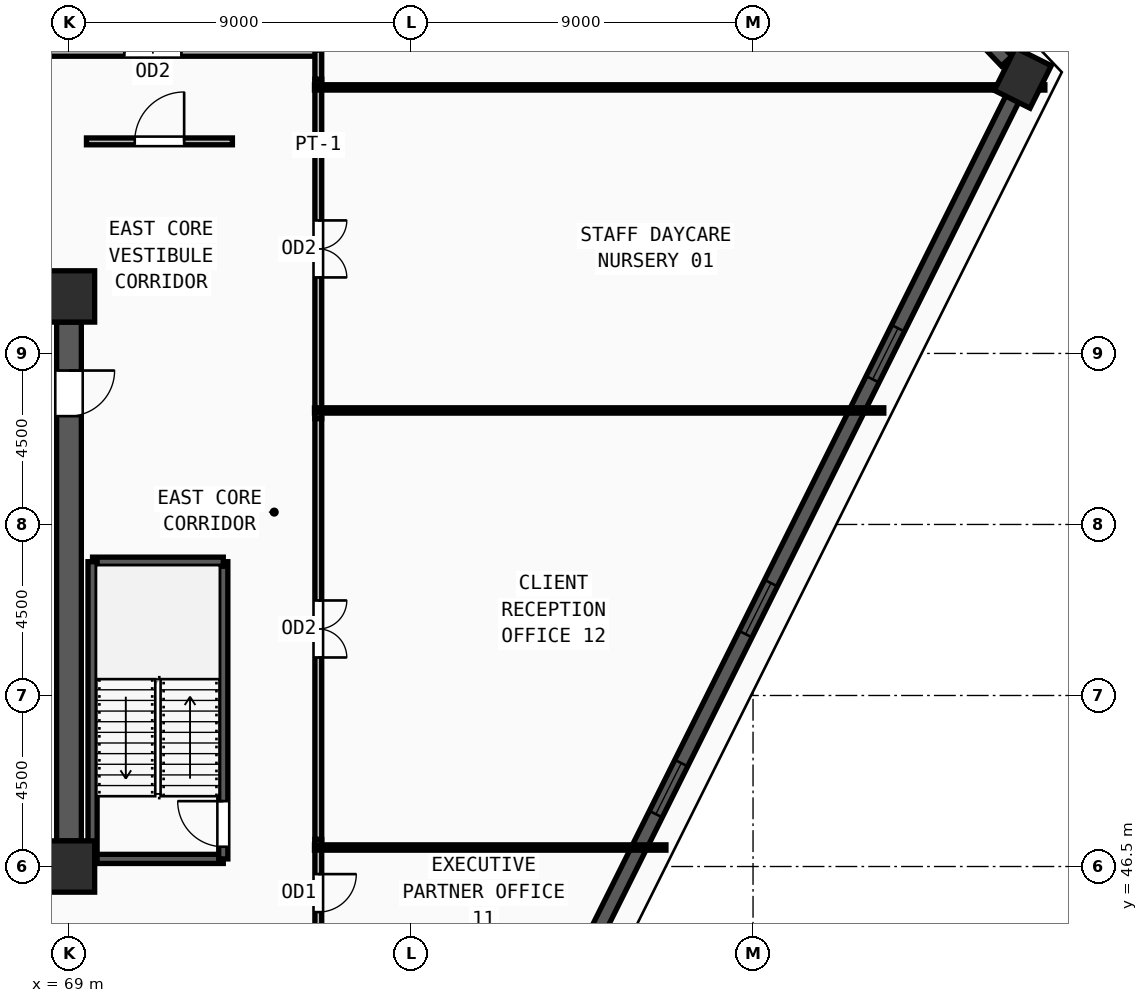
"""IFC4 building model, lengths in metres.
Left out: names, types, materials, properties, quantities, classifications, styles, units other than length and angle.
Written with IfcOpenShell. Run it as: python <this file> out.ifc"""

import sys

from ifc_helpers import new_model, si_unit, direction, frame, frame_2d, origin, origin_2d, place, context, subcontext, project, spatial, rectangle, extrude, source, transform, mapped, element, fill, save


model = new_model("IFC4")
c1 = context("Model", 3, precision=1e-05, world=origin(), true_north=direction((0.0, 1.0)))
c2 = subcontext(c1, "Body", "Model", "MODEL_VIEW")
j1 = project(units=[si_unit("LENGTHUNIT", "METRE"), si_unit("PLANEANGLEUNIT", "RADIAN")], contexts=[c1])
p1 = place(None, origin())
s1 = spatial("IfcSite", under=j1, at=p1, CompositionType="ELEMENT")
p2 = place(p1, origin())
s2 = spatial("IfcBuilding", under=s1, at=p2, CompositionType="ELEMENT")
p3 = place(p2, frame((0.0, 0.0, 194.25)))
s3 = spatial("IfcBuildingStorey", under=s2, at=p3, CompositionType="ELEMENT", Elevation=194.25)
m1 = source(origin(), c2, "Body", "SweptSolid", [
    extrude(rectangle(XDim=1.35, YDim=1.35, at=origin_2d()), origin(), (0.0, 0.0, 1.0), 3.75),
])
for number, where, z_axis, x_axis in (
    (1, (69.0, 46.5, 0.0), (0.0, 0.0, 1.0), (1.0, 0.0, 0.0)),
    (2, (69.0, 61.5, 0.0), (0.0, 0.0, 1.0), (1.0, 0.0, 0.0)),
):
    element("IfcColumn", number, at=place(p3, frame(where, z_axis=z_axis, x_axis=x_axis)), inside=s3, PredefinedType="COLUMN", context=c2, shape_type="MappedRepresentation", body=[
        mapped(m1, transform((0.0, 0.0, 0.0), x_axis=(1.0, 0.0, 0.0), y_axis=(0.0, 1.0, 0.0), z_axis=(0.0, 0.0, 1.0), scale=1.0)),
    ])
m2 = source(origin(), c2, "Body", "SweptSolid", [
    extrude(rectangle(XDim=1.25, YDim=1.05, at=origin_2d()), origin(), (0.0, 0.0, 1.0), 3.75),
])
p4 = place(p3, frame((94.098, 67.247, 0.0), z_axis=(0.0, 0.0, 1.0), x_axis=(0.44619781311, 0.894934361602, 0.0)))
e3 = element("IfcColumn", 3, at=p4, inside=s3, PredefinedType="COLUMN", context=c2, shape_type="MappedRepresentation", body=[
    mapped(m2, transform((0.0, 0.0, 0.0), x_axis=(1.0, 0.0, 0.0), y_axis=(0.0, 1.0, 0.0), z_axis=(0.0, 0.0, 1.0), scale=1.0)),
])
p5 = place(p3, frame((80.452, 39.875, 0.0), z_axis=(0.0, 0.0, 1.0), x_axis=(0.446173861236, 0.894946303166, 0.0)))
e4 = element("IfcWall", 4, at=p5, inside=s3, PredefinedType="SOLIDWALL", context=c2, shape_type="SweptSolid", body=[
    extrude(rectangle(XDim=29.97, YDim=0.38, at=frame_2d((14.985, 0.0))), origin(), (0.0, 0.0, 1.0), 3.57),
])
m3 = source(origin(), c2, "Body", "SweptSolid", [
    extrude(rectangle(XDim=1.5, YDim=1.9, at=frame_2d((0.75, 0.95))), frame((0.0, 0.2, 0.0), z_axis=(0.0, -1.0, 0.0), x_axis=(1.0, 0.0, 0.0)), (0.0, 0.0, 1.0), 0.4),
])
p6 = place(p5, frame((8.943, 0.0, 0.55)))
e5 = element("IfcOpeningElement", 5, at=p6, cuts=e4, PredefinedType="OPENING", context=c2, shape_type="MappedRepresentation", body=[
    mapped(m3, transform((0.0, 0.0, 0.0), x_axis=(1.0, 0.0, 0.0), y_axis=(0.0, 1.0, 0.0), z_axis=(0.0, 0.0, 1.0), scale=1.0)),
])
p7 = place(p5, frame((14.235, 0.0, 0.55)))
e6 = element("IfcOpeningElement", 6, at=p7, cuts=e4, PredefinedType="OPENING", context=c2, shape_type="MappedRepresentation", body=[
    mapped(m3, transform((0.0, 0.0, 0.0), x_axis=(1.0, 0.0, 0.0), y_axis=(0.0, 1.0, 0.0), z_axis=(0.0, 0.0, 1.0), scale=1.0)),
])
p8 = place(p5, frame((21.728, 0.0, 0.55)))
e7 = element("IfcOpeningElement", 7, at=p8, cuts=e4, PredefinedType="OPENING", context=c2, shape_type="MappedRepresentation", body=[
    mapped(m3, transform((0.0, 0.0, 0.0), x_axis=(1.0, 0.0, 0.0), y_axis=(0.0, 1.0, 0.0), z_axis=(0.0, 0.0, 1.0), scale=1.0)),
])
p9 = place(p3, frame((93.674, 67.693, 0.0), z_axis=(0.0, 0.0, 1.0), x_axis=(-0.689502290867, 0.724283501737, 0.0)))
e8 = element("IfcWall", 8, at=p9, inside=s3, PredefinedType="SOLIDWALL", context=c2, shape_type="SweptSolid", body=[
    extrude(rectangle(XDim=4.506, YDim=0.38, at=frame_2d((2.253, 0.0))), origin(), (0.0, 0.0, 1.0), 3.57),
])
m4 = source(origin(), c2, "Body", "SweptSolid", [
    extrude(rectangle(XDim=1.2, YDim=1.9, at=frame_2d((0.6, 0.95))), frame((0.0, 0.2, 0.0), z_axis=(0.0, -1.0, 0.0), x_axis=(1.0, 0.0, 0.0)), (0.0, 0.0, 1.0), 0.4),
])
p10 = place(p9, frame((1.653, 0.0, 0.55)))
e9 = element("IfcOpeningElement", 9, at=p10, cuts=e8, PredefinedType="OPENING", context=c2, shape_type="MappedRepresentation", body=[
    mapped(m4, transform((0.0, 0.0, 0.0), x_axis=(1.0, 0.0, 0.0), y_axis=(0.0, 1.0, 0.0), z_axis=(0.0, 0.0, 1.0), scale=1.0)),
])
p11 = place(p3, frame((69.0, 60.825, 0.0), z_axis=(0.0, 0.0, 1.0), x_axis=(0.0, -1.0, 0.0)))
e10 = element("IfcWall", 10, at=p11, inside=s3, PredefinedType="SHEAR", context=c2, shape_type="SweptSolid", body=[
    extrude(rectangle(XDim=13.65, YDim=0.65, at=frame_2d((6.825, 0.0))), origin(), (0.0, 0.0, 1.0), 3.57),
])
m5 = source(origin(), c2, "Body", "SweptSolid", [
    extrude(rectangle(XDim=1.2, YDim=2.2, at=frame_2d((0.6, 1.1))), frame((0.0, 0.335, 0.0), z_axis=(0.0, -1.0, 0.0), x_axis=(1.0, 0.0, 0.0)), (0.0, 0.0, 1.0), 0.67),
])
p12 = place(p11, frame((1.275, 0.0, 0.0)))
e11 = element("IfcOpeningElement", 11, at=p12, cuts=e10, PredefinedType="OPENING", context=c2, shape_type="MappedRepresentation", body=[
    mapped(m5, transform((0.0, 0.0, 0.0), x_axis=(1.0, 0.0, 0.0), y_axis=(0.0, 1.0, 0.0), z_axis=(0.0, 0.0, 1.0), scale=1.0)),
])
p13 = place(p3, frame((69.62, 46.7, 0.0), z_axis=(0.0, 0.0, 1.0), x_axis=(1.0, 0.0, 0.0)))
e12 = element("IfcWall", 12, at=p13, inside=s3, PredefinedType="SOLIDWALL", context=c2, shape_type="SweptSolid", body=[
    extrude(rectangle(XDim=3.44, YDim=0.24, at=frame_2d((1.72, 0.0))), origin(), (0.0, 0.0, 1.0), 3.57),
])
p14 = place(p3, frame((73.06, 46.7, 0.0), z_axis=(0.0, 0.0, 1.0), x_axis=(0.0, 1.0, 0.0)))
e13 = element("IfcWall", 13, at=p14, inside=s3, PredefinedType="SOLIDWALL", context=c2, shape_type="SweptSolid", body=[
    extrude(rectangle(XDim=7.82, YDim=0.24, at=frame_2d((3.91, 0.0))), origin(), (0.0, 0.0, 1.0), 3.57),
])
m6 = source(origin(), c2, "Body", "SweptSolid", [
    extrude(rectangle(XDim=1.2, YDim=2.2, at=frame_2d((0.6, 1.1))), frame((0.0, 0.13, 0.0), z_axis=(0.0, -1.0, 0.0), x_axis=(1.0, 0.0, 0.0)), (0.0, 0.0, 1.0), 0.26),
])
p15 = place(p14, frame((0.32, 0.0, 0.0)))
e14 = element("IfcOpeningElement", 14, at=p15, cuts=e13, PredefinedType="OPENING", context=c2, shape_type="MappedRepresentation", body=[
    mapped(m6, transform((0.0, 0.0, 0.0), x_axis=(1.0, 0.0, 0.0), y_axis=(0.0, 1.0, 0.0), z_axis=(0.0, 0.0, 1.0), scale=1.0)),
])
p16 = place(p3, frame((73.06, 54.52, 0.0), z_axis=(0.0, 0.0, 1.0), x_axis=(-1.0, 0.0, 0.0)))
e15 = element("IfcWall", 15, at=p16, inside=s3, PredefinedType="SOLIDWALL", context=c2, shape_type="SweptSolid", body=[
    extrude(rectangle(XDim=3.44, YDim=0.24, at=frame_2d((1.72, 0.0))), origin(), (0.0, 0.0, 1.0), 3.57),
])
p17 = place(p3, frame((69.62, 54.52, 0.0), z_axis=(0.0, 0.0, 1.0), x_axis=(0.0, -1.0, 0.0)))
e16 = element("IfcWall", 16, at=p17, inside=s3, PredefinedType="SOLIDWALL", context=c2, shape_type="SweptSolid", body=[
    extrude(rectangle(XDim=7.82, YDim=0.24, at=frame_2d((3.91, 0.0))), origin(), (0.0, 0.0, 1.0), 3.57),
])
p18 = place(p3, frame((69.46, 65.58, 0.0), z_axis=(0.0, 0.0, 1.0), x_axis=(1.0, 0.0, 0.0)))
e17 = element("IfcWall", 17, at=p18, inside=s3, PredefinedType="PARTITIONING", context=c2, shape_type="SweptSolid", body=[
    extrude(rectangle(XDim=3.84, YDim=0.18, at=frame_2d((1.92, 0.0))), origin(), (0.0, 0.0, 1.0), 3.57),
])
m7 = source(origin(), c2, "Body", "SweptSolid", [
    extrude(rectangle(XDim=1.3, YDim=2.2, at=frame_2d((0.65, 1.1))), frame((0.0, 0.1, 0.0), z_axis=(0.0, -1.0, 0.0), x_axis=(1.0, 0.0, 0.0)), (0.0, 0.0, 1.0), 0.2),
])
p19 = place(p18, frame((1.27, 0.0, 0.0)))
e18 = element("IfcOpeningElement", 18, at=p19, cuts=e17, PredefinedType="OPENING", context=c2, shape_type="MappedRepresentation", body=[
    mapped(m7, transform((0.0, 0.0, 0.0), x_axis=(1.0, 0.0, 0.0), y_axis=(0.0, 1.0, 0.0), z_axis=(0.0, 0.0, 1.0), scale=1.0)),
])
p20 = place(p3, frame((75.56, 67.215, 0.0), z_axis=(0.0, 0.0, 1.0), x_axis=(0.0, -1.0, 0.0)))
e19 = element("IfcWall", 19, at=p20, inside=s3, PredefinedType="PARTITIONING", context=c2, shape_type="SweptSolid", body=[
    extrude(rectangle(XDim=8.93, YDim=0.18, at=frame_2d((4.465, 0.0))), origin(), (0.0, 0.0, 1.0), 3.57),
])
m8 = source(origin(), c2, "Body", "SweptSolid", [
    extrude(rectangle(XDim=1.5, YDim=2.2, at=frame_2d((0.75, 1.1))), frame((0.0, 0.1, 0.0), z_axis=(0.0, -1.0, 0.0), x_axis=(1.0, 0.0, 0.0)), (0.0, 0.0, 1.0), 0.2),
])
p21 = place(p20, frame((3.715, 0.0, 0.0)))
e20 = element("IfcOpeningElement", 20, at=p21, cuts=e19, PredefinedType="OPENING", context=c2, shape_type="MappedRepresentation", body=[
    mapped(m8, transform((0.0, 0.0, 0.0), x_axis=(1.0, 0.0, 0.0), y_axis=(0.0, 1.0, 0.0), z_axis=(0.0, 0.0, 1.0), scale=1.0)),
])
p22 = place(p3, frame((66.785, 67.91, 0.0), z_axis=(0.0, 0.0, 1.0), x_axis=(1.0, 0.0, 0.0)))
e21 = element("IfcWall", 21, at=p22, inside=s3, PredefinedType="PARTITIONING", context=c2, shape_type="SweptSolid", body=[
    extrude(rectangle(XDim=8.845, YDim=0.18, at=frame_2d((4.422, 0.0))), origin(), (0.0, 0.0, 1.0), 3.57),
])
p23 = place(p22, frame((3.672, 0.0, 0.0)))
e22 = element("IfcOpeningElement", 22, at=p23, cuts=e21, PredefinedType="OPENING", context=c2, shape_type="MappedRepresentation", body=[
    mapped(m8, transform((0.0, 0.0, 0.0), x_axis=(1.0, 0.0, 0.0), y_axis=(0.0, 1.0, 0.0), z_axis=(0.0, 0.0, 1.0), scale=1.0)),
])
p24 = place(p3, frame((75.56, 47.215, 0.0), z_axis=(0.0, 0.0, 1.0), x_axis=(0.0, -1.0, 0.0)))
e23 = element("IfcWall", 23, at=p24, inside=s3, PredefinedType="PARTITIONING", context=c2, shape_type="SweptSolid", body=[
    extrude(rectangle(XDim=2.83, YDim=0.18, at=frame_2d((1.415, 0.0))), origin(), (0.0, 0.0, 1.0), 3.57),
])
m9 = source(origin(), c2, "Body", "SweptSolid", [
    extrude(rectangle(XDim=1.0, YDim=2.2, at=frame_2d((0.5, 1.1))), frame((0.0, 0.1, 0.0), z_axis=(0.0, -1.0, 0.0), x_axis=(1.0, 0.0, 0.0)), (0.0, 0.0, 1.0), 0.2),
])
p25 = place(p24, frame((0.915, 0.0, 0.0)))
e24 = element("IfcOpeningElement", 24, at=p25, cuts=e23, PredefinedType="OPENING", context=c2, shape_type="MappedRepresentation", body=[
    mapped(m9, transform((0.0, 0.0, 0.0), x_axis=(1.0, 0.0, 0.0), y_axis=(0.0, 1.0, 0.0), z_axis=(0.0, 0.0, 1.0), scale=1.0)),
])
p26 = place(p3, frame((75.56, 58.285, 0.0), z_axis=(0.0, 0.0, 1.0), x_axis=(0.0, -1.0, 0.0)))
e25 = element("IfcWall", 25, at=p26, inside=s3, PredefinedType="PARTITIONING", context=c2, shape_type="SweptSolid", body=[
    extrude(rectangle(XDim=11.07, YDim=0.18, at=frame_2d((5.535, 0.0))), origin(), (0.0, 0.0, 1.0), 3.57),
])
p27 = place(p26, frame((4.785, 0.0, 0.0)))
e26 = element("IfcOpeningElement", 26, at=p27, cuts=e25, PredefinedType="OPENING", context=c2, shape_type="MappedRepresentation", body=[
    mapped(m8, transform((0.0, 0.0, 0.0), x_axis=(1.0, 0.0, 0.0), y_axis=(0.0, 1.0, 0.0), z_axis=(0.0, 0.0, 1.0), scale=1.0)),
])
p28 = place(p3, frame((75.56, 67.98, 0.0), z_axis=(0.0, 0.0, 1.0), x_axis=(0.0, -1.0, 0.0)))
e27 = element("IfcWall", 27, at=p28, inside=s3, PredefinedType="PARTITIONING", context=c2, shape_type="SweptSolid", body=[
    extrude(rectangle(XDim=0.765, YDim=0.18, at=frame_2d((0.382, 0.0))), origin(), (0.0, 0.0, 1.0), 3.57),
])
p29 = place(p3, frame((75.46, 47.0, 0.0), z_axis=(0.0, 0.0, 1.0), x_axis=(1.0, 0.0, 0.0)))
e28 = element("IfcWall", 28, at=p29, inside=s3, PredefinedType="PARTITIONING", context=c2, shape_type="SweptSolid", body=[
    extrude(rectangle(XDim=9.248, YDim=0.14, at=frame_2d((4.624, 0.0))), origin(), (0.0, 0.0, 1.0), 3.57),
])
p30 = place(p3, frame((75.46, 58.5, 0.0), z_axis=(0.0, 0.0, 1.0), x_axis=(1.0, 0.0, 0.0)))
e29 = element("IfcWall", 29, at=p30, inside=s3, PredefinedType="PARTITIONING", context=c2, shape_type="SweptSolid", body=[
    extrude(rectangle(XDim=14.981, YDim=0.14, at=frame_2d((7.49, 0.0))), origin(), (0.0, 0.0, 1.0), 3.57),
])
p31 = place(p3, frame((75.46, 67.0, 0.0), z_axis=(0.0, 0.0, 1.0), x_axis=(1.0, 0.0, 0.0)))
e30 = element("IfcWall", 30, at=p31, inside=s3, PredefinedType="PARTITIONING", context=c2, shape_type="SweptSolid", body=[
    extrude(rectangle(XDim=19.219, YDim=0.14, at=frame_2d((9.609, 0.0))), origin(), (0.0, 0.0, 1.0), 2.855),
])
m10 = source(origin(), c2, "Body", "SweptSolid", [
    extrude(rectangle(XDim=1.5, YDim=1.9, at=frame_2d((0.75, 0.95))), frame((0.0, 0.03, 0.0), z_axis=(0.0, -1.0, 0.0), x_axis=(1.0, 0.0, 0.0)), (0.0, 0.0, 1.0), 0.06),
])
p32 = place(p6, origin())
e31 = element("IfcWindow", 31, at=p32, inside=s3, PartitioningType="DOUBLE_PANEL_VERTICAL", PredefinedType="WINDOW", context=c2, shape_type="MappedRepresentation", body=[
    mapped(m10, transform((0.0, 0.0, 0.0), x_axis=(1.0, 0.0, 0.0), y_axis=(0.0, 1.0, 0.0), z_axis=(0.0, 0.0, 1.0), scale=1.0)),
])
fill(e5, e31)
p33 = place(p7, origin())
e32 = element("IfcWindow", 32, at=p33, inside=s3, PartitioningType="DOUBLE_PANEL_VERTICAL", PredefinedType="WINDOW", context=c2, shape_type="MappedRepresentation", body=[
    mapped(m10, transform((0.0, 0.0, 0.0), x_axis=(1.0, 0.0, 0.0), y_axis=(0.0, 1.0, 0.0), z_axis=(0.0, 0.0, 1.0), scale=1.0)),
])
fill(e6, e32)
p34 = place(p8, origin())
e33 = element("IfcWindow", 33, at=p34, inside=s3, PartitioningType="DOUBLE_PANEL_VERTICAL", PredefinedType="WINDOW", context=c2, shape_type="MappedRepresentation", body=[
    mapped(m10, transform((0.0, 0.0, 0.0), x_axis=(1.0, 0.0, 0.0), y_axis=(0.0, 1.0, 0.0), z_axis=(0.0, 0.0, 1.0), scale=1.0)),
])
fill(e7, e33)
m11 = source(origin(), c2, "Body", "SweptSolid", [
    extrude(rectangle(XDim=1.2, YDim=2.2, at=frame_2d((0.6, 1.1))), frame((0.0, 0.025, 0.0), z_axis=(0.0, -1.0, 0.0), x_axis=(1.0, 0.0, 0.0)), (0.0, 0.0, 1.0), 0.05),
])
p35 = place(p12, origin())
e34 = element("IfcDoor", 34, at=p35, inside=s3, OperationType="SINGLE_SWING_LEFT", PredefinedType="DOOR", context=c2, shape_type="MappedRepresentation", body=[
    mapped(m11, transform((0.0, 0.0, 0.0), x_axis=(1.0, 0.0, 0.0), y_axis=(0.0, 1.0, 0.0), z_axis=(0.0, 0.0, 1.0), scale=1.0)),
])
fill(e11, e34)
p36 = place(p15, origin())
e35 = element("IfcDoor", 35, at=p36, inside=s3, OperationType="SINGLE_SWING_RIGHT", PredefinedType="DOOR", context=c2, shape_type="MappedRepresentation", body=[
    mapped(m11, transform((0.0, 0.0, 0.0), x_axis=(1.0, 0.0, 0.0), y_axis=(0.0, 1.0, 0.0), z_axis=(0.0, 0.0, 1.0), scale=1.0)),
])
fill(e14, e35)
m12 = source(origin(), c2, "Body", "SweptSolid", [
    extrude(rectangle(XDim=1.3, YDim=2.2, at=frame_2d((0.65, 1.1))), frame((0.0, 0.025, 0.0), z_axis=(0.0, -1.0, 0.0), x_axis=(1.0, 0.0, 0.0)), (0.0, 0.0, 1.0), 0.05),
])
p37 = place(p19, origin())
e36 = element("IfcDoor", 36, at=p37, inside=s3, OperationType="SINGLE_SWING_RIGHT", PredefinedType="DOOR", context=c2, shape_type="MappedRepresentation", body=[
    mapped(m12, transform((0.0, 0.0, 0.0), x_axis=(1.0, 0.0, 0.0), y_axis=(0.0, 1.0, 0.0), z_axis=(0.0, 0.0, 1.0), scale=1.0)),
])
fill(e18, e36)
m13 = source(origin(), c2, "Body", "SweptSolid", [
    extrude(rectangle(XDim=1.5, YDim=2.2, at=frame_2d((0.75, 1.1))), frame((0.0, 0.025, 0.0), z_axis=(0.0, -1.0, 0.0), x_axis=(1.0, 0.0, 0.0)), (0.0, 0.0, 1.0), 0.05),
])
p38 = place(p21, origin())
e37 = element("IfcDoor", 37, at=p38, inside=s3, OperationType="DOUBLE_DOOR_SINGLE_SWING", PredefinedType="DOOR", context=c2, shape_type="MappedRepresentation", body=[
    mapped(m13, transform((0.0, 0.0, 0.0), x_axis=(1.0, 0.0, 0.0), y_axis=(0.0, 1.0, 0.0), z_axis=(0.0, 0.0, 1.0), scale=1.0)),
])
fill(e20, e37)
p39 = place(p23, origin())
e38 = element("IfcDoor", 38, at=p39, inside=s3, OperationType="DOUBLE_DOOR_SINGLE_SWING", PredefinedType="DOOR", context=c2, shape_type="MappedRepresentation", body=[
    mapped(m13, transform((0.0, 0.0, 0.0), x_axis=(1.0, 0.0, 0.0), y_axis=(0.0, 1.0, 0.0), z_axis=(0.0, 0.0, 1.0), scale=1.0)),
])
fill(e22, e38)
m14 = source(origin(), c2, "Body", "SweptSolid", [
    extrude(rectangle(XDim=1.0, YDim=2.2, at=frame_2d((0.5, 1.1))), frame((0.0, 0.025, 0.0), z_axis=(0.0, -1.0, 0.0), x_axis=(1.0, 0.0, 0.0)), (0.0, 0.0, 1.0), 0.05),
])
p40 = place(p25, origin())
e39 = element("IfcDoor", 39, at=p40, inside=s3, OperationType="SINGLE_SWING_LEFT", PredefinedType="DOOR", context=c2, shape_type="MappedRepresentation", body=[
    mapped(m14, transform((0.0, 0.0, 0.0), x_axis=(1.0, 0.0, 0.0), y_axis=(0.0, 1.0, 0.0), z_axis=(0.0, 0.0, 1.0), scale=1.0)),
])
fill(e24, e39)
p41 = place(p27, origin())
e40 = element("IfcDoor", 40, at=p41, inside=s3, OperationType="DOUBLE_DOOR_SINGLE_SWING", PredefinedType="DOOR", context=c2, shape_type="MappedRepresentation", body=[
    mapped(m13, transform((0.0, 0.0, 0.0), x_axis=(1.0, 0.0, 0.0), y_axis=(0.0, 1.0, 0.0), z_axis=(0.0, 0.0, 1.0), scale=1.0)),
])
fill(e26, e40)
save(model, sys.argv[1])
